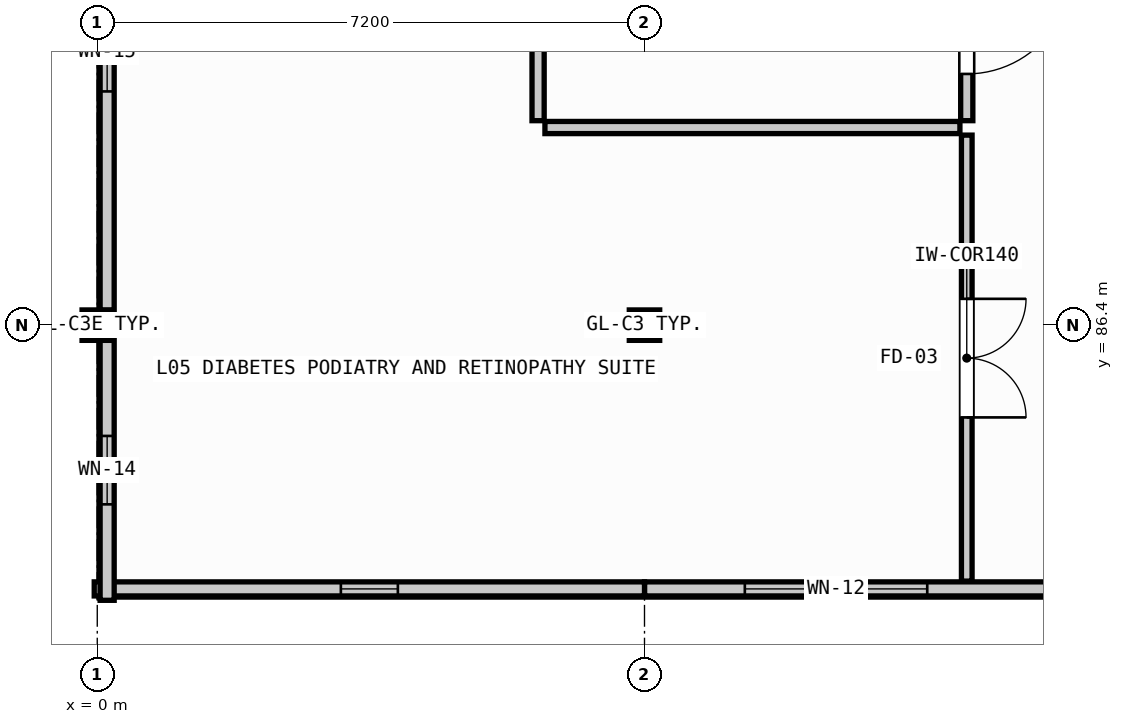
"""IFC4 building model, lengths in metres.
Left out: names, types, materials, properties, quantities, classifications, styles, units other than length and angle.
Written with IfcOpenShell. Run it as: python <this file> out.ifc"""

import sys

from ifc_helpers import new_model, si_unit, direction, frame, frame_2d, origin, origin_2d, place, context, subcontext, project, spatial, rectangle, extrude, element, fill, save


model = new_model("IFC4")
c1 = context("Model", 3, precision=1e-05, world=origin(), true_north=direction((0.0, 1.0)))
c2 = subcontext(c1, "Body", "Model", "MODEL_VIEW")
j1 = project(units=[si_unit("LENGTHUNIT", "METRE"), si_unit("PLANEANGLEUNIT", "RADIAN")], contexts=[c1])
p1 = place(None, origin())
s1 = spatial("IfcSite", under=j1, at=p1, CompositionType="ELEMENT")
p2 = place(p1, origin())
s2 = spatial("IfcBuilding", under=s1, at=p2, CompositionType="ELEMENT")
p3 = place(p2, frame((0.0, 0.0, 17.7)))
s3 = spatial("IfcBuildingStorey", under=s2, at=p3, CompositionType="ELEMENT", Elevation=17.7)
for number, where, z_axis, x_axis in (
    (1, (0.0, 86.4, 0.0), (0.0, 0.0, 1.0), (1.0, 0.0, 0.0)),
    (2, (7.2, 86.4, 0.0), (0.0, 0.0, 1.0), (1.0, 0.0, 0.0)),
):
    element("IfcColumn", number, at=place(p3, frame(where, z_axis=z_axis, x_axis=x_axis)), inside=s3, PredefinedType="COLUMN", context=c2, shape_type="SweptSolid", body=[
        extrude(rectangle(XDim=0.4, YDim=0.4, at=origin_2d()), origin(), (0.0, 0.0, 1.0), 3.69),
    ])
p4 = place(p3, frame((14.44, 82.93, 0.0), z_axis=(0.0, 0.0, 1.0), x_axis=(-1.0, 0.0, 0.0)))
e3 = element("IfcWall", 3, at=p4, inside=s3, PredefinedType="SOLIDWALL", context=c2, shape_type="SweptSolid", body=[
    extrude(rectangle(XDim=7.24, YDim=0.185, at=frame_2d((3.62, 0.0))), origin(), (0.0, 0.0, 1.0), 3.67),
])
p5 = place(p4, frame((3.52, 0.0, 2.1)))
e4 = element("IfcOpeningElement", 4, at=p5, cuts=e3, PredefinedType="OPENING", context=c2, shape_type="SweptSolid", body=[
    extrude(rectangle(XDim=2.4, YDim=0.65, at=frame_2d((1.2, 0.325))), frame((0.0, 0.103, 0.0), z_axis=(0.0, -1.0, 0.0), x_axis=(1.0, 0.0, 0.0)), (0.0, 0.0, 1.0), 0.205),
])
p6 = place(p3, frame((7.2, 82.93, 0.0), z_axis=(0.0, 0.0, 1.0), x_axis=(-1.0, 0.0, 0.0)))
e5 = element("IfcWall", 5, at=p6, inside=s3, PredefinedType="SOLIDWALL", context=c2, shape_type="SweptSolid", body=[
    extrude(rectangle(XDim=7.24, YDim=0.185, at=frame_2d((3.62, 0.0))), origin(), (0.0, 0.0, 1.0), 3.67),
])
p7 = place(p6, frame((3.245, 0.0, 1.5)))
e6 = element("IfcOpeningElement", 6, at=p7, cuts=e5, PredefinedType="OPENING", context=c2, shape_type="SweptSolid", body=[
    extrude(rectangle(XDim=0.75, YDim=0.95, at=frame_2d((0.375, 0.475))), frame((0.0, 0.103, 0.0), z_axis=(0.0, -1.0, 0.0), x_axis=(1.0, 0.0, 0.0)), (0.0, 0.0, 1.0), 0.205),
])
p8 = place(p3, frame((0.13, 82.78, 0.0), z_axis=(0.0, 0.0, 1.0), x_axis=(0.0, 1.0, 0.0)))
e7 = element("IfcWall", 7, at=p8, inside=s3, PredefinedType="SOLIDWALL", context=c2, shape_type="SweptSolid", body=[
    extrude(rectangle(XDim=3.425, YDim=0.185, at=frame_2d((1.712, 0.0))), origin(), (0.0, 0.0, 1.0), 3.05),
])
p9 = place(p8, frame((1.262, 0.0, 1.5)))
e8 = element("IfcOpeningElement", 8, at=p9, cuts=e7, PredefinedType="OPENING", context=c2, shape_type="SweptSolid", body=[
    extrude(rectangle(XDim=0.9, YDim=0.95, at=frame_2d((0.45, 0.475))), frame((0.0, 0.103, 0.0), z_axis=(0.0, -1.0, 0.0), x_axis=(1.0, 0.0, 0.0)), (0.0, 0.0, 1.0), 0.205),
])
p10 = place(p3, frame((0.13, 86.595, 0.0), z_axis=(0.0, 0.0, 1.0), x_axis=(0.0, 1.0, 0.0)))
e9 = element("IfcWall", 9, at=p10, inside=s3, PredefinedType="SOLIDWALL", context=c2, shape_type="SweptSolid", body=[
    extrude(rectangle(XDim=6.81, YDim=0.185, at=frame_2d((3.405, 0.0))), origin(), (0.0, 0.0, 1.0), 3.05),
])
p11 = place(p10, frame((2.88, 0.0, 1.5)))
e10 = element("IfcOpeningElement", 10, at=p11, cuts=e9, PredefinedType="OPENING", context=c2, shape_type="SweptSolid", body=[
    extrude(rectangle(XDim=1.05, YDim=0.95, at=frame_2d((0.525, 0.475))), frame((0.0, 0.103, 0.0), z_axis=(0.0, -1.0, 0.0), x_axis=(1.0, 0.0, 0.0)), (0.0, 0.0, 1.0), 0.205),
])
p12 = place(p3, frame((11.44, 91.7, 0.0), z_axis=(0.0, 0.0, 1.0), x_axis=(0.0, -1.0, 0.0)))
e11 = element("IfcWall", 11, at=p12, inside=s3, PredefinedType="PLUMBINGWALL", context=c2, shape_type="SweptSolid", body=[
    extrude(rectangle(XDim=2.61, YDim=0.16, at=frame_2d((1.305, 0.0))), origin(), (0.0, 0.0, 1.0), 3.67),
])
p13 = place(p12, frame((0.615, 0.0, 0.0)))
e12 = element("IfcOpeningElement", 12, at=p13, cuts=e11, PredefinedType="OPENING", context=c2, shape_type="SweptSolid", body=[
    extrude(rectangle(XDim=1.38, YDim=2.32, at=frame_2d((0.69, 1.16))), frame((0.0, 0.09, 0.0), z_axis=(0.0, -1.0, 0.0), x_axis=(1.0, 0.0, 0.0)), (0.0, 0.0, 1.0), 0.18),
])
p14 = place(p3, frame((11.35, 89.0, 0.0), z_axis=(0.0, 0.0, 1.0), x_axis=(-1.0, 0.0, 0.0)))
e13 = element("IfcWall", 13, at=p14, inside=s3, PredefinedType="PLUMBINGWALL", context=c2, shape_type="SweptSolid", body=[
    extrude(rectangle(XDim=5.46, YDim=0.16, at=frame_2d((2.73, 0.0))), origin(), (0.0, 0.0, 1.0), 3.13),
])
p15 = place(p3, frame((5.8, 89.09, 0.0), z_axis=(0.0, 0.0, 1.0), x_axis=(0.0, 1.0, 0.0)))
e14 = element("IfcWall", 14, at=p15, inside=s3, PredefinedType="PLUMBINGWALL", context=c2, shape_type="SweptSolid", body=[
    extrude(rectangle(XDim=2.61, YDim=0.16, at=frame_2d((1.305, 0.0))), origin(), (0.0, 0.0, 1.0), 3.67),
])
p16 = place(p3, frame((11.44, 88.9, 0.0), z_axis=(0.0, 0.0, 1.0), x_axis=(0.0, -1.0, 0.0)))
e15 = element("IfcWall", 15, at=p16, inside=s3, PredefinedType="PARTITIONING", context=c2, shape_type="SweptSolid", body=[
    extrude(rectangle(XDim=5.867, YDim=0.14, at=frame_2d((2.934, 0.0))), origin(), (0.0, 0.0, 1.0), 3.05),
])
p17 = place(p16, frame((2.154, 0.0, 0.0)))
e16 = element("IfcOpeningElement", 16, at=p17, cuts=e15, PredefinedType="OPENING", context=c2, shape_type="SweptSolid", body=[
    extrude(rectangle(XDim=1.56, YDim=2.22, at=frame_2d((0.78, 1.11))), frame((0.0, 0.08, 0.0), z_axis=(0.0, -1.0, 0.0), x_axis=(1.0, 0.0, 0.0)), (0.0, 0.0, 1.0), 0.16),
])
p18 = place(p5, origin())
e17 = element("IfcWindow", 17, at=p18, inside=s3, PartitioningType="SINGLE_PANEL", PredefinedType="WINDOW", context=c2, shape_type="SweptSolid", body=[
    extrude(rectangle(XDim=2.4, YDim=0.65, at=frame_2d((1.2, 0.325))), frame((0.0, 0.03, 0.0), z_axis=(0.0, -1.0, 0.0), x_axis=(1.0, 0.0, 0.0)), (0.0, 0.0, 1.0), 0.06),
])
fill(e4, e17)
p19 = place(p7, origin())
e18 = element("IfcWindow", 18, at=p19, inside=s3, PartitioningType="SINGLE_PANEL", PredefinedType="WINDOW", context=c2, shape_type="SweptSolid", body=[
    extrude(rectangle(XDim=0.75, YDim=0.95, at=frame_2d((0.375, 0.475))), frame((0.0, 0.03, 0.0), z_axis=(0.0, -1.0, 0.0), x_axis=(1.0, 0.0, 0.0)), (0.0, 0.0, 1.0), 0.06),
])
fill(e6, e18)
p20 = place(p9, origin())
e19 = element("IfcWindow", 19, at=p20, inside=s3, PartitioningType="SINGLE_PANEL", PredefinedType="WINDOW", context=c2, shape_type="SweptSolid", body=[
    extrude(rectangle(XDim=0.9, YDim=0.95, at=frame_2d((0.45, 0.475))), frame((0.0, 0.03, 0.0), z_axis=(0.0, -1.0, 0.0), x_axis=(1.0, 0.0, 0.0)), (0.0, 0.0, 1.0), 0.06),
])
fill(e8, e19)
p21 = place(p11, origin())
e20 = element("IfcWindow", 20, at=p21, inside=s3, PartitioningType="SINGLE_PANEL", PredefinedType="WINDOW", context=c2, shape_type="SweptSolid", body=[
    extrude(rectangle(XDim=1.05, YDim=0.95, at=frame_2d((0.525, 0.475))), frame((0.0, 0.03, 0.0), z_axis=(0.0, -1.0, 0.0), x_axis=(1.0, 0.0, 0.0)), (0.0, 0.0, 1.0), 0.06),
])
fill(e10, e20)
p22 = place(p13, origin())
e21 = element("IfcDoor", 21, at=p22, inside=s3, OperationType="SINGLE_SWING_LEFT", PredefinedType="DOOR", context=c2, shape_type="SweptSolid", body=[
    extrude(rectangle(XDim=1.38, YDim=2.32, at=frame_2d((0.69, 1.16))), frame((0.0, 0.025, 0.0), z_axis=(0.0, -1.0, 0.0), x_axis=(1.0, 0.0, 0.0)), (0.0, 0.0, 1.0), 0.05),
])
fill(e12, e21)
p23 = place(p17, origin())
e22 = element("IfcDoor", 22, at=p23, inside=s3, OperationType="DOUBLE_DOOR_SINGLE_SWING", PredefinedType="DOOR", context=c2, shape_type="SweptSolid", body=[
    extrude(rectangle(XDim=1.56, YDim=2.22, at=frame_2d((0.78, 1.11))), frame((0.0, 0.025, 0.0), z_axis=(0.0, -1.0, 0.0), x_axis=(1.0, 0.0, 0.0)), (0.0, 0.0, 1.0), 0.05),
])
fill(e16, e22)
save(model, sys.argv[1])
